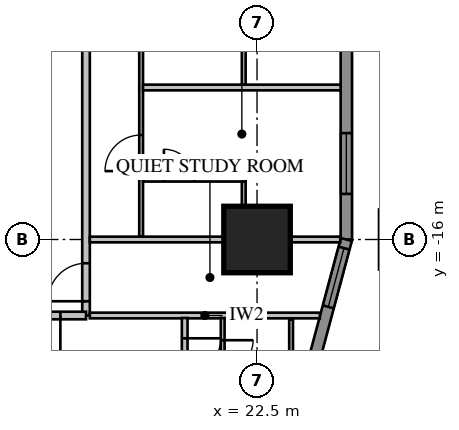
"""IFC4 building model, lengths in metres.
Left out: names, types, materials, properties, quantities, classifications, styles, units other than length and angle.
Written with IfcOpenShell. Run it as: python <this file> out.ifc"""

import sys

from ifc_helpers import new_model, si_unit, direction, frame, frame_2d, origin, origin_2d, place, context, subcontext, project, spatial, rectangle, extrude, element, fill, save


model = new_model("IFC4")
c1 = context("Model", 3, precision=1e-05, world=origin(), true_north=direction((0.0, 1.0)))
c2 = subcontext(c1, "Body", "Model", "MODEL_VIEW")
j1 = project(units=[si_unit("LENGTHUNIT", "METRE"), si_unit("PLANEANGLEUNIT", "RADIAN")], contexts=[c1])
p1 = place(None, origin())
s1 = spatial("IfcSite", under=j1, at=p1, CompositionType="ELEMENT")
p2 = place(p1, origin())
s2 = spatial("IfcBuilding", under=s1, at=p2, CompositionType="ELEMENT")
p3 = place(p2, frame((0.0, 0.0, 19.85)))
s3 = spatial("IfcBuildingStorey", under=s2, at=p3, CompositionType="ELEMENT", Elevation=19.85)
p4 = place(p3, frame((22.5, -16.0, 0.0), z_axis=(0.0, 0.0, 1.0), x_axis=(1.0, 0.0, 0.0)))
e1 = element("IfcColumn", 1, at=p4, inside=s3, PredefinedType="COLUMN", context=c2, shape_type="SweptSolid", body=[
    extrude(rectangle(XDim=1.75, YDim=1.75, at=origin_2d()), origin(), (0.0, 0.0, 1.0), 3.85),
])
p5 = place(p3, frame((24.85, -16.0, 0.0), z_axis=(0.0, 0.0, 1.0), x_axis=(0.0, 1.0, 0.0)))
e2 = element("IfcWall", 2, at=p5, inside=s3, PredefinedType="SOLIDWALL", context=c2, shape_type="SweptSolid", body=[
    extrude(rectangle(XDim=32.0, YDim=0.3, at=frame_2d((16.0, 0.0))), origin(), (0.0, 0.0, 1.0), 3.65),
])
p6 = place(p5, frame((1.2, 0.0, 0.75)))
e3 = element("IfcOpeningElement", 3, at=p6, cuts=e2, PredefinedType="OPENING", context=c2, shape_type="SweptSolid", body=[
    extrude(rectangle(XDim=1.6, YDim=1.8, at=frame_2d((0.8, 0.9))), frame((0.0, 0.17, 0.0), z_axis=(0.0, -1.0, 0.0), x_axis=(1.0, 0.0, 0.0)), (0.0, 0.0, 1.0), 0.34),
])
p7 = place(p5, frame((5.2, 0.0, 0.75)))
e4 = element("IfcOpeningElement", 4, at=p7, cuts=e2, PredefinedType="OPENING", context=c2, shape_type="SweptSolid", body=[
    extrude(rectangle(XDim=1.6, YDim=1.8, at=frame_2d((0.8, 0.9))), frame((0.0, 0.17, 0.0), z_axis=(0.0, -1.0, 0.0), x_axis=(1.0, 0.0, 0.0)), (0.0, 0.0, 1.0), 0.34),
])
p8 = place(p5, frame((17.2, 0.0, 0.75)))
e5 = element("IfcOpeningElement", 5, at=p8, cuts=e2, PredefinedType="OPENING", context=c2, shape_type="SweptSolid", body=[
    extrude(rectangle(XDim=1.6, YDim=1.8, at=frame_2d((0.8, 0.9))), frame((0.0, 0.17, 0.0), z_axis=(0.0, -1.0, 0.0), x_axis=(1.0, 0.0, 0.0)), (0.0, 0.0, 1.0), 0.34),
])
p9 = place(p5, frame((21.2, 0.0, 0.75)))
e6 = element("IfcOpeningElement", 6, at=p9, cuts=e2, PredefinedType="OPENING", context=c2, shape_type="SweptSolid", body=[
    extrude(rectangle(XDim=1.6, YDim=1.8, at=frame_2d((0.8, 0.9))), frame((0.0, 0.17, 0.0), z_axis=(0.0, -1.0, 0.0), x_axis=(1.0, 0.0, 0.0)), (0.0, 0.0, 1.0), 0.34),
])
p10 = place(p5, frame((25.2, 0.0, 0.75)))
e7 = element("IfcOpeningElement", 7, at=p10, cuts=e2, PredefinedType="OPENING", context=c2, shape_type="SweptSolid", body=[
    extrude(rectangle(XDim=1.6, YDim=1.8, at=frame_2d((0.8, 0.9))), frame((0.0, 0.17, 0.0), z_axis=(0.0, -1.0, 0.0), x_axis=(1.0, 0.0, 0.0)), (0.0, 0.0, 1.0), 0.34),
])
p11 = place(p5, frame((29.2, 0.0, 0.75)))
e8 = element("IfcOpeningElement", 8, at=p11, cuts=e2, PredefinedType="OPENING", context=c2, shape_type="SweptSolid", body=[
    extrude(rectangle(XDim=1.6, YDim=1.8, at=frame_2d((0.8, 0.9))), frame((0.0, 0.17, 0.0), z_axis=(0.0, -1.0, 0.0), x_axis=(1.0, 0.0, 0.0)), (0.0, 0.0, 1.0), 0.34),
])
p12 = place(p5, frame((8.8, 0.0, 0.75)))
e9 = element("IfcOpeningElement", 9, at=p12, cuts=e2, PredefinedType="OPENING", context=c2, shape_type="SweptSolid", body=[
    extrude(rectangle(XDim=2.4, YDim=1.8, at=frame_2d((1.2, 0.9))), frame((0.0, 0.17, 0.0), z_axis=(0.0, -1.0, 0.0), x_axis=(1.0, 0.0, 0.0)), (0.0, 0.0, 1.0), 0.34),
])
p13 = place(p5, frame((13.812, 0.0, 0.0)))
e10 = element("IfcOpeningElement", 10, at=p13, cuts=e2, PredefinedType="OPENING", context=c2, shape_type="SweptSolid", body=[
    extrude(rectangle(XDim=1.0, YDim=2.4, at=frame_2d((0.5, 1.2))), frame((0.0, 0.17, 0.0), z_axis=(0.0, -1.0, 0.0), x_axis=(1.0, 0.0, 0.0)), (0.0, 0.0, 1.0), 0.34),
])
p14 = place(p3, frame((23.664, -20.425, 0.0), z_axis=(0.0, 0.0, 1.0), x_axis=(0.258839972501, 0.965920218567, 0.0)))
e11 = element("IfcWall", 11, at=p14, inside=s3, PredefinedType="SOLIDWALL", context=c2, shape_type="SweptSolid", body=[
    extrude(rectangle(XDim=4.581, YDim=0.3, at=frame_2d((2.291, 0.0))), origin(), (0.0, 0.0, 1.0), 3.65),
])
p15 = place(p14, frame((2.746, 0.0, 0.75)))
e12 = element("IfcOpeningElement", 12, at=p15, cuts=e11, PredefinedType="OPENING", context=c2, shape_type="SweptSolid", body=[
    extrude(rectangle(XDim=1.6, YDim=1.8, at=frame_2d((0.8, 0.9))), frame((0.0, 0.17, 0.0), z_axis=(0.0, -1.0, 0.0), x_axis=(1.0, 0.0, 0.0)), (0.0, 0.0, 1.0), 0.34),
])
p16 = place(p3, frame((18.0, -18.0, 0.0), z_axis=(0.0, 0.0, 1.0), x_axis=(0.0, 1.0, 0.0)))
e13 = element("IfcWall", 13, at=p16, inside=s3, PredefinedType="PARTITIONING", context=c2, shape_type="SweptSolid", body=[
    extrude(rectangle(XDim=36.0, YDim=0.2, at=frame_2d((18.0, 0.0))), origin(), (0.0, 0.0, 1.0), 3.65),
])
p17 = place(p16, frame((10.4, 0.0, 0.0)))
e14 = element("IfcOpeningElement", 14, at=p17, cuts=e13, PredefinedType="OPENING", context=c2, shape_type="SweptSolid", body=[
    extrude(rectangle(XDim=1.0, YDim=2.1, at=frame_2d((0.5, 1.05))), frame((0.0, 0.12, 0.0), z_axis=(0.0, -1.0, 0.0), x_axis=(1.0, 0.0, 0.0)), (0.0, 0.0, 1.0), 0.24),
])
p18 = place(p16, frame((0.375, 0.0, 0.0)))
e15 = element("IfcOpeningElement", 15, at=p18, cuts=e13, PredefinedType="OPENING", context=c2, shape_type="SweptSolid", body=[
    extrude(rectangle(XDim=1.0, YDim=2.1, at=frame_2d((0.5, 1.05))), frame((0.0, 0.12, 0.0), z_axis=(0.0, -1.0, 0.0), x_axis=(1.0, 0.0, 0.0)), (0.0, 0.0, 1.0), 0.24),
])
p19 = place(p16, frame((34.375, 0.0, 0.0)))
e16 = element("IfcOpeningElement", 16, at=p19, cuts=e13, PredefinedType="OPENING", context=c2, shape_type="SweptSolid", body=[
    extrude(rectangle(XDim=0.95, YDim=2.1, at=frame_2d((0.475, 1.05))), frame((0.0, 0.12, 0.0), z_axis=(0.0, -1.0, 0.0), x_axis=(1.0, 0.0, 0.0)), (0.0, 0.0, 1.0), 0.24),
])
p20 = place(p3, frame((19.45, -15.925, 0.0), z_axis=(0.0, 0.0, 1.0), x_axis=(0.0, 1.0, 0.0)))
e17 = element("IfcWall", 17, at=p20, inside=s3, PredefinedType="PARTITIONING", context=c2, shape_type="SweptSolid", body=[
    extrude(rectangle(XDim=31.85, YDim=0.1, at=frame_2d((15.925, 0.0))), origin(), (0.0, 0.0, 1.0), 3.65),
])
p21 = place(p20, frame((10.125, 0.0, 0.0)))
e18 = element("IfcOpeningElement", 18, at=p21, cuts=e17, PredefinedType="OPENING", context=c2, shape_type="SweptSolid", body=[
    extrude(rectangle(XDim=1.0, YDim=2.1, at=frame_2d((0.5, 1.05))), frame((0.0, 0.07, 0.0), z_axis=(0.0, -1.0, 0.0), x_axis=(1.0, 0.0, 0.0)), (0.0, 0.0, 1.0), 0.14),
])
p22 = place(p20, frame((8.3, 0.0, 0.0)))
e19 = element("IfcOpeningElement", 19, at=p22, cuts=e17, PredefinedType="OPENING", context=c2, shape_type="SweptSolid", body=[
    extrude(rectangle(XDim=0.8, YDim=2.1, at=frame_2d((0.4, 1.05))), frame((0.0, 0.07, 0.0), z_axis=(0.0, -1.0, 0.0), x_axis=(1.0, 0.0, 0.0)), (0.0, 0.0, 1.0), 0.14),
])
p23 = place(p20, frame((1.725, 0.0, 0.0)))
e20 = element("IfcOpeningElement", 20, at=p23, cuts=e17, PredefinedType="OPENING", context=c2, shape_type="SweptSolid", body=[
    extrude(rectangle(XDim=0.95, YDim=2.1, at=frame_2d((0.475, 1.05))), frame((0.0, 0.07, 0.0), z_axis=(0.0, -1.0, 0.0), x_axis=(1.0, 0.0, 0.0)), (0.0, 0.0, 1.0), 0.14),
])
p24 = place(p20, frame((5.725, 0.0, 0.0)))
e21 = element("IfcOpeningElement", 21, at=p24, cuts=e17, PredefinedType="OPENING", context=c2, shape_type="SweptSolid", body=[
    extrude(rectangle(XDim=0.95, YDim=2.1, at=frame_2d((0.475, 1.05))), frame((0.0, 0.07, 0.0), z_axis=(0.0, -1.0, 0.0), x_axis=(1.0, 0.0, 0.0)), (0.0, 0.0, 1.0), 0.14),
])
p25 = place(p20, frame((17.725, 0.0, 0.0)))
e22 = element("IfcOpeningElement", 22, at=p25, cuts=e17, PredefinedType="OPENING", context=c2, shape_type="SweptSolid", body=[
    extrude(rectangle(XDim=0.95, YDim=2.1, at=frame_2d((0.475, 1.05))), frame((0.0, 0.07, 0.0), z_axis=(0.0, -1.0, 0.0), x_axis=(1.0, 0.0, 0.0)), (0.0, 0.0, 1.0), 0.14),
])
p26 = place(p20, frame((21.725, 0.0, 0.0)))
e23 = element("IfcOpeningElement", 23, at=p26, cuts=e17, PredefinedType="OPENING", context=c2, shape_type="SweptSolid", body=[
    extrude(rectangle(XDim=0.95, YDim=2.1, at=frame_2d((0.475, 1.05))), frame((0.0, 0.07, 0.0), z_axis=(0.0, -1.0, 0.0), x_axis=(1.0, 0.0, 0.0)), (0.0, 0.0, 1.0), 0.14),
])
p27 = place(p20, frame((25.725, 0.0, 0.0)))
e24 = element("IfcOpeningElement", 24, at=p27, cuts=e17, PredefinedType="OPENING", context=c2, shape_type="SweptSolid", body=[
    extrude(rectangle(XDim=0.95, YDim=2.1, at=frame_2d((0.475, 1.05))), frame((0.0, 0.07, 0.0), z_axis=(0.0, -1.0, 0.0), x_axis=(1.0, 0.0, 0.0)), (0.0, 0.0, 1.0), 0.14),
])
p28 = place(p20, frame((29.725, 0.0, 0.0)))
e25 = element("IfcOpeningElement", 25, at=p28, cuts=e17, PredefinedType="OPENING", context=c2, shape_type="SweptSolid", body=[
    extrude(rectangle(XDim=0.95, YDim=2.1, at=frame_2d((0.475, 1.05))), frame((0.0, 0.07, 0.0), z_axis=(0.0, -1.0, 0.0), x_axis=(1.0, 0.0, 0.0)), (0.0, 0.0, 1.0), 0.14),
])
p29 = place(p3, frame((18.1, -18.0, 0.0), z_axis=(0.0, 0.0, 1.0), x_axis=(1.0, 0.0, 0.0)))
e26 = element("IfcWall", 26, at=p29, inside=s3, PredefinedType="PARTITIONING", context=c2, shape_type="SweptSolid", body=[
    extrude(rectangle(XDim=6.053, YDim=0.15, at=frame_2d((3.027, 0.0))), origin(), (0.0, 0.0, 1.0), 3.65),
])
p30 = place(p3, frame((18.1, -16.0, 0.0), z_axis=(0.0, 0.0, 1.0), x_axis=(1.0, 0.0, 0.0)))
e27 = element("IfcWall", 27, at=p30, inside=s3, PredefinedType="PARTITIONING", context=c2, shape_type="SweptSolid", body=[
    extrude(rectangle(XDim=6.589, YDim=0.15, at=frame_2d((3.295, 0.0))), origin(), (0.0, 0.0, 1.0), 3.65),
])
p31 = place(p3, frame((19.5, -12.0, 0.0), z_axis=(0.0, 0.0, 1.0), x_axis=(1.0, 0.0, 0.0)))
e28 = element("IfcWall", 28, at=p31, inside=s3, PredefinedType="PARTITIONING", context=c2, shape_type="SweptSolid", body=[
    extrude(rectangle(XDim=5.2, YDim=0.15, at=frame_2d((2.6, 0.0))), origin(), (0.0, 0.0, 1.0), 3.65),
])
p32 = place(p3, frame((19.5, -14.425, 0.0), z_axis=(0.0, 0.0, 1.0), x_axis=(1.0, 0.0, 0.0)))
e29 = element("IfcWall", 29, at=p32, inside=s3, PredefinedType="PARTITIONING", context=c2, shape_type="SweptSolid", body=[
    extrude(rectangle(XDim=2.7, YDim=0.1, at=frame_2d((1.35, 0.0))), origin(), (0.0, 0.0, 1.0), 3.65),
])
p33 = place(p32, frame((0.55, 0.0, 0.0)))
e30 = element("IfcOpeningElement", 30, at=p33, cuts=e29, PredefinedType="OPENING", context=c2, shape_type="SweptSolid", body=[
    extrude(rectangle(XDim=0.8, YDim=2.1, at=frame_2d((0.4, 1.05))), frame((0.0, 0.07, 0.0), z_axis=(0.0, -1.0, 0.0), x_axis=(1.0, 0.0, 0.0)), (0.0, 0.0, 1.0), 0.14),
])
for number, where, z_axis, x_axis in (
    (31, (22.15, -15.925, 0.0), (0.0, 0.0, 1.0), (0.0, 1.0, 0.0)),
    (32, (22.15, -11.925, 0.0), (0.0, 0.0, 1.0), (0.0, 1.0, 0.0)),
):
    element("IfcWall", number, at=place(p3, frame(where, z_axis=z_axis, x_axis=x_axis)), inside=s3, PredefinedType="PARTITIONING", context=c2, shape_type="SweptSolid", body=[
        extrude(rectangle(XDim=1.45, YDim=0.1, at=frame_2d((0.725, 0.0))), origin(), (0.0, 0.0, 1.0), 3.65),
    ])
p34 = place(p3, frame((-18.0, -18.0, 0.0), z_axis=(0.0, 0.0, 1.0), x_axis=(1.0, 0.0, 0.0)))
e33 = element("IfcWall", 33, at=p34, inside=s3, PredefinedType="PARTITIONING", context=c2, shape_type="SweptSolid", body=[
    extrude(rectangle(XDim=36.0, YDim=0.2, at=frame_2d((18.0, 0.0))), origin(), (0.0, 0.0, 1.0), 3.65),
])
p35 = place(p34, frame((0.375, 0.0, 0.0)))
e34 = element("IfcOpeningElement", 34, at=p35, cuts=e33, PredefinedType="OPENING", context=c2, shape_type="SweptSolid", body=[
    extrude(rectangle(XDim=1.0, YDim=2.1, at=frame_2d((0.5, 1.05))), frame((0.0, 0.12, 0.0), z_axis=(0.0, -1.0, 0.0), x_axis=(1.0, 0.0, 0.0)), (0.0, 0.0, 1.0), 0.24),
])
p36 = place(p34, frame((2.45, 0.0, 0.0)))
e35 = element("IfcOpeningElement", 35, at=p36, cuts=e33, PredefinedType="OPENING", context=c2, shape_type="SweptSolid", body=[
    extrude(rectangle(XDim=0.8, YDim=2.1, at=frame_2d((0.4, 1.05))), frame((0.0, 0.12, 0.0), z_axis=(0.0, -1.0, 0.0), x_axis=(1.0, 0.0, 0.0)), (0.0, 0.0, 1.0), 0.24),
])
p37 = place(p34, frame((4.05, 0.0, 0.0)))
e36 = element("IfcOpeningElement", 36, at=p37, cuts=e33, PredefinedType="OPENING", context=c2, shape_type="SweptSolid", body=[
    extrude(rectangle(XDim=1.0, YDim=2.1, at=frame_2d((0.5, 1.05))), frame((0.0, 0.12, 0.0), z_axis=(0.0, -1.0, 0.0), x_axis=(1.0, 0.0, 0.0)), (0.0, 0.0, 1.0), 0.24),
])
p38 = place(p34, frame((6.45, 0.0, 0.0)))
e37 = element("IfcOpeningElement", 37, at=p38, cuts=e33, PredefinedType="OPENING", context=c2, shape_type="SweptSolid", body=[
    extrude(rectangle(XDim=0.9, YDim=2.1, at=frame_2d((0.45, 1.05))), frame((0.0, 0.12, 0.0), z_axis=(0.0, -1.0, 0.0), x_axis=(1.0, 0.0, 0.0)), (0.0, 0.0, 1.0), 0.24),
])
p39 = place(p34, frame((8.15, 0.0, 0.0)))
e38 = element("IfcOpeningElement", 38, at=p39, cuts=e33, PredefinedType="OPENING", context=c2, shape_type="SweptSolid", body=[
    extrude(rectangle(XDim=1.0, YDim=2.1, at=frame_2d((0.5, 1.05))), frame((0.0, 0.12, 0.0), z_axis=(0.0, -1.0, 0.0), x_axis=(1.0, 0.0, 0.0)), (0.0, 0.0, 1.0), 0.24),
])
p40 = place(p34, frame((19.8, 0.0, 0.0)))
e39 = element("IfcOpeningElement", 39, at=p40, cuts=e33, PredefinedType="OPENING", context=c2, shape_type="SweptSolid", body=[
    extrude(rectangle(XDim=0.95, YDim=2.1, at=frame_2d((0.475, 1.05))), frame((0.0, 0.12, 0.0), z_axis=(0.0, -1.0, 0.0), x_axis=(1.0, 0.0, 0.0)), (0.0, 0.0, 1.0), 0.24),
])
p41 = place(p34, frame((23.8, 0.0, 0.0)))
e40 = element("IfcOpeningElement", 40, at=p41, cuts=e33, PredefinedType="OPENING", context=c2, shape_type="SweptSolid", body=[
    extrude(rectangle(XDim=0.95, YDim=2.1, at=frame_2d((0.475, 1.05))), frame((0.0, 0.12, 0.0), z_axis=(0.0, -1.0, 0.0), x_axis=(1.0, 0.0, 0.0)), (0.0, 0.0, 1.0), 0.24),
])
p42 = place(p34, frame((27.8, 0.0, 0.0)))
e41 = element("IfcOpeningElement", 41, at=p42, cuts=e33, PredefinedType="OPENING", context=c2, shape_type="SweptSolid", body=[
    extrude(rectangle(XDim=0.95, YDim=2.1, at=frame_2d((0.475, 1.05))), frame((0.0, 0.12, 0.0), z_axis=(0.0, -1.0, 0.0), x_axis=(1.0, 0.0, 0.0)), (0.0, 0.0, 1.0), 0.24),
])
p43 = place(p34, frame((31.8, 0.0, 0.0)))
e42 = element("IfcOpeningElement", 42, at=p43, cuts=e33, PredefinedType="OPENING", context=c2, shape_type="SweptSolid", body=[
    extrude(rectangle(XDim=0.95, YDim=2.1, at=frame_2d((0.475, 1.05))), frame((0.0, 0.12, 0.0), z_axis=(0.0, -1.0, 0.0), x_axis=(1.0, 0.0, 0.0)), (0.0, 0.0, 1.0), 0.24),
])
p44 = place(p34, frame((34.375, 0.0, 0.0)))
e43 = element("IfcOpeningElement", 43, at=p44, cuts=e33, PredefinedType="OPENING", context=c2, shape_type="SweptSolid", body=[
    extrude(rectangle(XDim=0.95, YDim=2.1, at=frame_2d((0.475, 1.05))), frame((0.0, 0.12, 0.0), z_axis=(0.0, -1.0, 0.0), x_axis=(1.0, 0.0, 0.0)), (0.0, 0.0, 1.0), 0.24),
])
p45 = place(p34, frame((11.2, 0.0, 0.0)))
e44 = element("IfcOpeningElement", 44, at=p45, cuts=e33, PredefinedType="OPENING", context=c2, shape_type="SweptSolid", body=[
    extrude(rectangle(XDim=1.0, YDim=2.1, at=frame_2d((0.5, 1.05))), frame((0.0, 0.12, 0.0), z_axis=(0.0, -1.0, 0.0), x_axis=(1.0, 0.0, 0.0)), (0.0, 0.0, 1.0), 0.24),
])
p46 = place(p3, frame((21.596, -18.065, 0.0), z_axis=(0.0, 0.0, 1.0), x_axis=(0.0, -1.0, 0.0)))
e45 = element("IfcWall", 45, at=p46, inside=s3, PredefinedType="PARTITIONING", context=c2, shape_type="SweptSolid", body=[
    extrude(rectangle(XDim=2.335, YDim=0.1, at=frame_2d((1.167, 0.0))), origin(), (0.0, 0.0, 1.0), 3.65),
])
p47 = place(p46, frame((0.585, 0.0, 0.0)))
e46 = element("IfcOpeningElement", 46, at=p47, cuts=e45, PredefinedType="OPENING", context=c2, shape_type="SweptSolid", body=[
    extrude(rectangle(XDim=0.8, YDim=2.1, at=frame_2d((0.4, 1.05))), frame((0.0, 0.07, 0.0), z_axis=(0.0, -1.0, 0.0), x_axis=(1.0, 0.0, 0.0)), (0.0, 0.0, 1.0), 0.14),
])
p48 = place(p3, frame((23.396, -18.1, 0.0), z_axis=(0.0, 0.0, 1.0), x_axis=(0.0, -1.0, 0.0)))
e47 = element("IfcWall", 47, at=p48, inside=s3, PredefinedType="PARTITIONING", context=c2, shape_type="SweptSolid", body=[
    extrude(rectangle(XDim=2.3, YDim=0.1, at=frame_2d((1.15, 0.0))), origin(), (0.0, 0.0, 1.0), 3.65),
])
p49 = place(p3, frame((20.596, -18.065, 0.0), z_axis=(0.0, 0.0, 1.0), x_axis=(0.0, -1.0, 0.0)))
e48 = element("IfcWall", 48, at=p49, inside=s3, PredefinedType="PARTITIONING", context=c2, shape_type="SweptSolid", body=[
    extrude(rectangle(XDim=5.209, YDim=0.15, at=frame_2d((2.604, 0.0))), origin(), (0.0, 0.0, 1.0), 3.65),
])
p50 = place(p49, frame((0.535, 0.0, 0.0)))
e49 = element("IfcOpeningElement", 49, at=p50, cuts=e48, PredefinedType="OPENING", context=c2, shape_type="SweptSolid", body=[
    extrude(rectangle(XDim=0.95, YDim=2.1, at=frame_2d((0.475, 1.05))), frame((0.0, 0.095, 0.0), z_axis=(0.0, -1.0, 0.0), x_axis=(1.0, 0.0, 0.0)), (0.0, 0.0, 1.0), 0.19),
])
p51 = place(p15, origin())
e50 = element("IfcWindow", 50, at=p51, inside=s3, PartitioningType="SINGLE_PANEL", PredefinedType="WINDOW", context=c2, shape_type="SweptSolid", body=[
    extrude(rectangle(XDim=1.6, YDim=1.8, at=frame_2d((0.8, 0.9))), frame((0.0, 0.03, 0.0), z_axis=(0.0, -1.0, 0.0), x_axis=(1.0, 0.0, 0.0)), (0.0, 0.0, 1.0), 0.06),
])
fill(e12, e50)
p52 = place(p6, origin())
e51 = element("IfcWindow", 51, at=p52, inside=s3, PartitioningType="SINGLE_PANEL", PredefinedType="WINDOW", context=c2, shape_type="SweptSolid", body=[
    extrude(rectangle(XDim=1.6, YDim=1.8, at=frame_2d((0.8, 0.9))), frame((0.0, 0.03, 0.0), z_axis=(0.0, -1.0, 0.0), x_axis=(1.0, 0.0, 0.0)), (0.0, 0.0, 1.0), 0.06),
])
fill(e3, e51)
p53 = place(p18, origin())
e52 = element("IfcDoor", 52, at=p53, inside=s3, OperationType="SINGLE_SWING_LEFT", PredefinedType="DOOR", context=c2, shape_type="SweptSolid", body=[
    extrude(rectangle(XDim=1.0, YDim=2.1, at=frame_2d((0.5, 1.05))), frame((0.0, 0.025, 0.0), z_axis=(0.0, -1.0, 0.0), x_axis=(1.0, 0.0, 0.0)), (0.0, 0.0, 1.0), 0.05),
])
fill(e15, e52)
p54 = place(p23, origin())
e53 = element("IfcDoor", 53, at=p54, inside=s3, OperationType="SINGLE_SWING_LEFT", PredefinedType="DOOR", context=c2, shape_type="SweptSolid", body=[
    extrude(rectangle(XDim=0.95, YDim=2.1, at=frame_2d((0.475, 1.05))), frame((0.0, 0.025, 0.0), z_axis=(0.0, -1.0, 0.0), x_axis=(1.0, 0.0, 0.0)), (0.0, 0.0, 1.0), 0.05),
])
fill(e20, e53)
p55 = place(p33, origin())
e54 = element("IfcDoor", 54, at=p55, inside=s3, OperationType="SINGLE_SWING_LEFT", PredefinedType="DOOR", context=c2, shape_type="SweptSolid", body=[
    extrude(rectangle(XDim=0.8, YDim=2.1, at=frame_2d((0.4, 1.05))), frame((0.0, 0.025, 0.0), z_axis=(0.0, -1.0, 0.0), x_axis=(1.0, 0.0, 0.0)), (0.0, 0.0, 1.0), 0.05),
])
fill(e30, e54)
p56 = place(p44, origin())
e55 = element("IfcDoor", 55, at=p56, inside=s3, OperationType="SINGLE_SWING_RIGHT", PredefinedType="DOOR", context=c2, shape_type="SweptSolid", body=[
    extrude(rectangle(XDim=0.95, YDim=2.1, at=frame_2d((0.475, 1.05))), frame((0.0, 0.025, 0.0), z_axis=(0.0, -1.0, 0.0), x_axis=(1.0, 0.0, 0.0)), (0.0, 0.0, 1.0), 0.05),
])
fill(e43, e55)
p57 = place(p47, origin())
e56 = element("IfcDoor", 56, at=p57, inside=s3, OperationType="SINGLE_SWING_LEFT", PredefinedType="DOOR", context=c2, shape_type="SweptSolid", body=[
    extrude(rectangle(XDim=0.8, YDim=2.1, at=frame_2d((0.4, 1.05))), frame((0.0, 0.025, 0.0), z_axis=(0.0, -1.0, 0.0), x_axis=(1.0, 0.0, 0.0)), (0.0, 0.0, 1.0), 0.05),
])
fill(e46, e56)
p58 = place(p50, origin())
e57 = element("IfcDoor", 57, at=p58, inside=s3, OperationType="SINGLE_SWING_LEFT", PredefinedType="DOOR", context=c2, shape_type="SweptSolid", body=[
    extrude(rectangle(XDim=0.95, YDim=2.1, at=frame_2d((0.475, 1.05))), frame((0.0, 0.025, 0.0), z_axis=(0.0, -1.0, 0.0), x_axis=(1.0, 0.0, 0.0)), (0.0, 0.0, 1.0), 0.05),
])
fill(e49, e57)
save(model, sys.argv[1])
